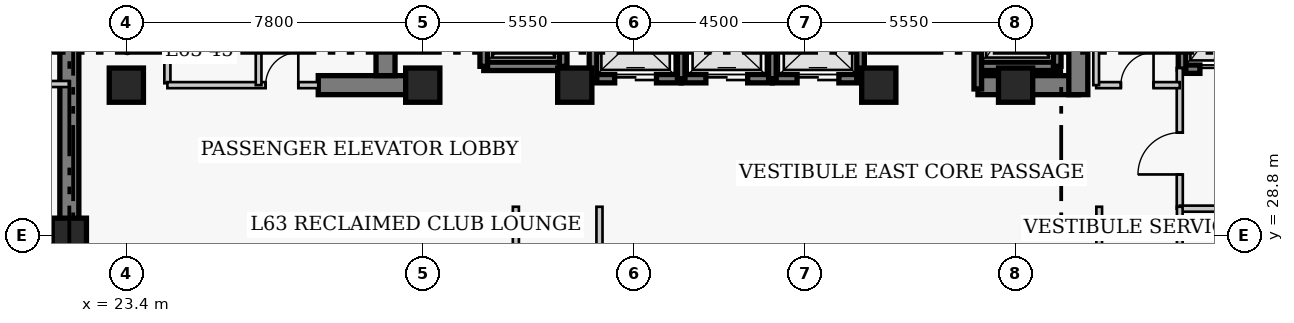
"""IFC4 building model, lengths in metres.
Left out: names, types, materials, properties, quantities, classifications, styles, units other than length and angle.
Written with IfcOpenShell. Run it as: python <this file> out.ifc"""

import sys

from ifc_helpers import new_model, si_unit, direction, frame, frame_2d, origin, origin_2d, place, context, subcontext, project, spatial, rectangle, extrude, element, fill, save


model = new_model("IFC4")
c1 = context("Model", 3, precision=1e-05, world=origin(), true_north=direction((0.0, 1.0)))
c2 = subcontext(c1, "Body", "Model", "MODEL_VIEW")
j1 = project(units=[si_unit("LENGTHUNIT", "METRE"), si_unit("PLANEANGLEUNIT", "RADIAN")], contexts=[c1])
p1 = place(None, origin())
s1 = spatial("IfcSite", under=j1, at=p1, CompositionType="ELEMENT")
p2 = place(p1, origin())
s2 = spatial("IfcBuilding", under=s1, at=p2, CompositionType="ELEMENT")
p3 = place(p2, frame((0.0, 0.0, 253.4)))
s3 = spatial("IfcBuildingStorey", under=s2, at=p3, CompositionType="ELEMENT", Elevation=253.4)
p4 = place(p3, frame((21.9, 27.05, 0.0), z_axis=(0.0, 0.0, 1.0), x_axis=(0.0, 1.0, 0.0)))
e1 = element("IfcWall", 1, at=p4, inside=s3, PredefinedType="SHEAR", context=c2, shape_type="SweptSolid", body=[
    extrude(rectangle(XDim=13.52, YDim=0.5, at=frame_2d((6.76, 0.0))), origin(), (0.0, 0.0, 1.0), 4.0),
])
p5 = place(p3, frame((28.45, 32.75, 0.0), z_axis=(0.0, 0.0, 1.0), x_axis=(1.0, 0.0, 0.0)))
e2 = element("IfcWall", 2, at=p5, inside=s3, PredefinedType="SHEAR", context=c2, shape_type="SweptSolid", body=[
    extrude(rectangle(XDim=2.4, YDim=0.5, at=frame_2d((1.2, 0.0))), origin(), (0.0, 0.0, 1.0), 4.0),
])
p6 = place(p3, frame((45.81, 32.75, 0.0), z_axis=(0.0, 0.0, 1.0), x_axis=(1.0, 0.0, 0.0)))
e3 = element("IfcWall", 3, at=p6, inside=s3, PredefinedType="SHEAR", context=c2, shape_type="SweptSolid", body=[
    extrude(rectangle(XDim=2.64, YDim=0.5, at=frame_2d((1.32, 0.0))), origin(), (0.0, 0.0, 1.0), 4.0),
])
p7 = place(p3, frame((30.22, 33.0, 0.0), z_axis=(0.0, 0.0, 1.0), x_axis=(0.0, 1.0, 0.0)))
e4 = element("IfcWall", 4, at=p7, inside=s3, PredefinedType="SHEAR", context=c2, shape_type="SweptSolid", body=[
    extrude(rectangle(XDim=7.32, YDim=0.5, at=frame_2d((3.66, 0.0))), origin(), (0.0, 0.0, 1.0), 4.0),
])
p8 = place(p3, frame((48.45, 32.5, 0.0), z_axis=(0.0, 0.0, 1.0), x_axis=(0.0, 1.0, 0.0)))
e5 = element("IfcWall", 5, at=p8, inside=s3, PredefinedType="SHEAR", context=c2, shape_type="SweptSolid", body=[
    extrude(rectangle(XDim=7.82, YDim=0.5, at=frame_2d((3.91, 0.0))), origin(), (0.0, 0.0, 1.0), 4.0),
])
p9 = place(p8, frame((5.7, 0.0, 0.0)))
e6 = element("IfcOpeningElement", 6, at=p9, cuts=e5, PredefinedType="OPENING", context=c2, shape_type="SweptSolid", body=[
    extrude(rectangle(XDim=1.1, YDim=2.15, at=frame_2d((0.55, 1.075))), frame((0.0, 0.26, 0.0), z_axis=(0.0, -1.0, 0.0), x_axis=(1.0, 0.0, 0.0)), (0.0, 0.0, 1.0), 0.52),
])
for number, where, z_axis, x_axis in (
    (7, (21.9, 28.8, 0.0), (0.0, 0.0, 1.0), (1.0, 0.0, 0.0)),
    (8, (23.4, 32.75, 0.0), (0.0, 0.0, 1.0), (1.0, 0.0, 0.0)),
    (9, (31.2, 32.75, 0.0), (0.0, 0.0, 1.0), (1.0, 0.0, 0.0)),
    (10, (35.2, 32.75, 0.0), (0.0, 0.0, 1.0), (1.0, 0.0, 0.0)),
    (11, (43.2, 32.75, 0.0), (0.0, 0.0, 1.0), (1.0, 0.0, 0.0)),
    (12, (46.8, 32.75, 0.0), (0.0, 0.0, 1.0), (1.0, 0.0, 0.0)),
):
    element("IfcColumn", number, at=place(p3, frame(where, z_axis=z_axis, x_axis=x_axis)), inside=s3, PredefinedType="COLUMN", context=c2, shape_type="SweptSolid", body=[
        extrude(rectangle(XDim=0.9, YDim=0.9, at=origin_2d()), origin(), (0.0, 0.0, 1.0), 4.0),
    ])
p10 = place(p3, frame((35.68, 32.92, 0.0), z_axis=(0.0, 0.0, 1.0), x_axis=(1.0, 0.0, 0.0)))
e13 = element("IfcWall", 13, at=p10, inside=s3, PredefinedType="SHEAR", context=c2, shape_type="SweptSolid", body=[
    extrude(rectangle(XDim=2.32, YDim=0.22, at=frame_2d((1.16, 0.0))), origin(), (0.0, 0.0, 1.0), 4.0),
])
p11 = place(p10, frame((0.57, 0.0, 0.0)))
e14 = element("IfcOpeningElement", 14, at=p11, cuts=e13, PredefinedType="OPENING", context=c2, shape_type="SweptSolid", body=[
    extrude(rectangle(XDim=1.1, YDim=2.15, at=frame_2d((0.55, 1.075))), frame((0.0, 0.12, 0.0), z_axis=(0.0, -1.0, 0.0), x_axis=(1.0, 0.0, 0.0)), (0.0, 0.0, 1.0), 0.24),
])
p12 = place(p3, frame((35.68, 32.92, 0.0), z_axis=(0.0, 0.0, 1.0), x_axis=(0.0, 1.0, 0.0)))
e15 = element("IfcWall", 15, at=p12, inside=s3, PredefinedType="SHEAR", context=c2, shape_type="SweptSolid", body=[
    extrude(rectangle(XDim=2.16, YDim=0.2, at=frame_2d((1.08, 0.0))), origin(), (0.0, 0.0, 1.0), 4.0),
])
p13 = place(p3, frame((38.0, 32.92, 0.0), z_axis=(0.0, 0.0, 1.0), x_axis=(1.0, 0.0, 0.0)))
e16 = element("IfcWall", 16, at=p13, inside=s3, PredefinedType="SHEAR", context=c2, shape_type="SweptSolid", body=[
    extrude(rectangle(XDim=2.4, YDim=0.22, at=frame_2d((1.2, 0.0))), origin(), (0.0, 0.0, 1.0), 4.0),
])
p14 = place(p13, frame((0.65, 0.0, 0.0)))
e17 = element("IfcOpeningElement", 17, at=p14, cuts=e16, PredefinedType="OPENING", context=c2, shape_type="SweptSolid", body=[
    extrude(rectangle(XDim=1.1, YDim=2.15, at=frame_2d((0.55, 1.075))), frame((0.0, 0.12, 0.0), z_axis=(0.0, -1.0, 0.0), x_axis=(1.0, 0.0, 0.0)), (0.0, 0.0, 1.0), 0.24),
])
p15 = place(p3, frame((38.0, 32.92, 0.0), z_axis=(0.0, 0.0, 1.0), x_axis=(0.0, 1.0, 0.0)))
e18 = element("IfcWall", 18, at=p15, inside=s3, PredefinedType="SHEAR", context=c2, shape_type="SweptSolid", body=[
    extrude(rectangle(XDim=2.16, YDim=0.2, at=frame_2d((1.08, 0.0))), origin(), (0.0, 0.0, 1.0), 4.0),
])
p16 = place(p3, frame((40.4, 32.92, 0.0), z_axis=(0.0, 0.0, 1.0), x_axis=(1.0, 0.0, 0.0)))
e19 = element("IfcWall", 19, at=p16, inside=s3, PredefinedType="SHEAR", context=c2, shape_type="SweptSolid", body=[
    extrude(rectangle(XDim=2.32, YDim=0.22, at=frame_2d((1.16, 0.0))), origin(), (0.0, 0.0, 1.0), 4.0),
])
p17 = place(p16, frame((0.65, 0.0, 0.0)))
e20 = element("IfcOpeningElement", 20, at=p17, cuts=e19, PredefinedType="OPENING", context=c2, shape_type="SweptSolid", body=[
    extrude(rectangle(XDim=1.1, YDim=2.15, at=frame_2d((0.55, 1.075))), frame((0.0, 0.12, 0.0), z_axis=(0.0, -1.0, 0.0), x_axis=(1.0, 0.0, 0.0)), (0.0, 0.0, 1.0), 0.24),
])
for number, where, z_axis, x_axis in (
    (21, (40.4, 32.92, 0.0), (0.0, 0.0, 1.0), (0.0, 1.0, 0.0)),
    (22, (42.72, 32.92, 0.0), (0.0, 0.0, 1.0), (0.0, 1.0, 0.0)),
):
    element("IfcWall", number, at=place(p3, frame(where, z_axis=z_axis, x_axis=x_axis)), inside=s3, PredefinedType="SHEAR", context=c2, shape_type="SweptSolid", body=[
        extrude(rectangle(XDim=2.16, YDim=0.2, at=frame_2d((1.08, 0.0))), origin(), (0.0, 0.0, 1.0), 4.0),
    ])
p18 = place(p3, frame((51.18, 33.17, 0.0), z_axis=(0.0, 0.0, 1.0), x_axis=(1.0, 0.0, 0.0)))
e23 = element("IfcWall", 23, at=p18, inside=s3, PredefinedType="SHEAR", context=c2, shape_type="SweptSolid", body=[
    extrude(rectangle(XDim=2.42, YDim=0.22, at=frame_2d((1.21, 0.0))), origin(), (0.0, 0.0, 1.0), 4.0),
])
p19 = place(p18, frame((0.47, 0.0, 0.0)))
e24 = element("IfcOpeningElement", 24, at=p19, cuts=e23, PredefinedType="OPENING", context=c2, shape_type="SweptSolid", body=[
    extrude(rectangle(XDim=1.3, YDim=2.15, at=frame_2d((0.65, 1.075))), frame((0.0, 0.12, 0.0), z_axis=(0.0, -1.0, 0.0), x_axis=(1.0, 0.0, 0.0)), (0.0, 0.0, 1.0), 0.24),
])
p20 = place(p3, frame((51.18, 33.17, 0.0), z_axis=(0.0, 0.0, 1.0), x_axis=(0.0, 1.0, 0.0)))
e25 = element("IfcWall", 25, at=p20, inside=s3, PredefinedType="SHEAR", context=c2, shape_type="SweptSolid", body=[
    extrude(rectangle(XDim=2.86, YDim=0.2, at=frame_2d((1.43, 0.0))), origin(), (0.0, 0.0, 1.0), 4.0),
])
p21 = place(p3, frame((32.805, 33.245, 0.0), z_axis=(0.0, 0.0, 1.0), x_axis=(1.0, 0.0, 0.0)))
e26 = element("IfcWall", 26, at=p21, inside=s3, PredefinedType="SHEAR", context=c2, shape_type="SweptSolid", body=[
    extrude(rectangle(XDim=2.09, YDim=0.22, at=frame_2d((1.045, 0.0))), origin(), (0.0, 0.0, 1.0), 4.0),
])
for number, where, z_axis, x_axis in (
    (27, (32.805, 33.245, 0.0), (0.0, 0.0, 1.0), (0.0, 1.0, 0.0)),
    (28, (34.895, 33.245, 0.0), (0.0, 0.0, 1.0), (0.0, 1.0, 0.0)),
):
    element("IfcWall", number, at=place(p3, frame(where, z_axis=z_axis, x_axis=x_axis)), inside=s3, PredefinedType="SHEAR", context=c2, shape_type="SweptSolid", body=[
        extrude(rectangle(XDim=2.91, YDim=0.2, at=frame_2d((1.455, 0.0))), origin(), (0.0, 0.0, 1.0), 4.0),
    ])
p22 = place(p3, frame((45.805, 33.245, 0.0), z_axis=(0.0, 0.0, 1.0), x_axis=(1.0, 0.0, 0.0)))
e29 = element("IfcWall", 29, at=p22, inside=s3, PredefinedType="SHEAR", context=c2, shape_type="SweptSolid", body=[
    extrude(rectangle(XDim=2.09, YDim=0.22, at=frame_2d((1.045, 0.0))), origin(), (0.0, 0.0, 1.0), 4.0),
])
p23 = place(p3, frame((45.805, 32.65, 0.0), z_axis=(0.0, 0.0, 1.0), x_axis=(0.0, 1.0, 0.0)))
e30 = element("IfcWall", 30, at=p23, inside=s3, PredefinedType="SHEAR", context=c2, shape_type="SweptSolid", body=[
    extrude(rectangle(XDim=3.505, YDim=0.2, at=frame_2d((1.752, 0.0))), origin(), (0.0, 0.0, 1.0), 4.0),
])
p24 = place(p3, frame((47.895, 33.245, 0.0), z_axis=(0.0, 0.0, 1.0), x_axis=(0.0, 1.0, 0.0)))
e31 = element("IfcWall", 31, at=p24, inside=s3, PredefinedType="SHEAR", context=c2, shape_type="SweptSolid", body=[
    extrude(rectangle(XDim=2.91, YDim=0.2, at=frame_2d((1.455, 0.0))), origin(), (0.0, 0.0, 1.0), 4.0),
])
p25 = place(p3, frame((24.48, 32.8, 0.0), z_axis=(0.0, 0.0, 1.0), x_axis=(0.0, 1.0, 0.0)))
e32 = element("IfcWall", 32, at=p25, inside=s3, PredefinedType="PARTITIONING", context=c2, shape_type="SweptSolid", body=[
    extrude(rectangle(XDim=3.57, YDim=0.16, at=frame_2d((1.785, 0.0))), origin(), (0.0, 0.0, 1.0), 3.76),
])
p26 = place(p25, frame((1.604, 0.0, 0.0)))
e33 = element("IfcOpeningElement", 33, at=p26, cuts=e32, PredefinedType="OPENING", context=c2, shape_type="SweptSolid", body=[
    extrude(rectangle(XDim=0.9, YDim=2.1, at=frame_2d((0.45, 1.05))), frame((0.0, 0.09, 0.0), z_axis=(0.0, -1.0, 0.0), x_axis=(1.0, 0.0, 0.0)), (0.0, 0.0, 1.0), 0.18),
])
p27 = place(p3, frame((51.12, 29.5, 0.0), z_axis=(0.0, 0.0, 1.0), x_axis=(0.0, 1.0, 0.0)))
e34 = element("IfcWall", 34, at=p27, inside=s3, PredefinedType="PARTITIONING", context=c2, shape_type="SweptSolid", body=[
    extrude(rectangle(XDim=3.7, YDim=0.16, at=frame_2d((1.85, 0.0))), origin(), (0.0, 0.0, 1.0), 3.76),
])
p28 = place(p27, frame((0.9, 0.0, 0.0)))
e35 = element("IfcOpeningElement", 35, at=p28, cuts=e34, PredefinedType="OPENING", context=c2, shape_type="SweptSolid", body=[
    extrude(rectangle(XDim=1.1, YDim=2.15, at=frame_2d((0.55, 1.075))), frame((0.0, 0.09, 0.0), z_axis=(0.0, -1.0, 0.0), x_axis=(1.0, 0.0, 0.0)), (0.0, 0.0, 1.0), 0.18),
])
p29 = place(p3, frame((51.12, 29.5, 0.0), z_axis=(0.0, 0.0, 1.0), x_axis=(1.0, 0.0, 0.0)))
e36 = element("IfcWall", 36, at=p29, inside=s3, PredefinedType="PARTITIONING", context=c2, shape_type="SweptSolid", body=[
    extrude(rectangle(XDim=5.63, YDim=0.16, at=frame_2d((2.815, 0.0))), origin(), (0.0, 0.0, 1.0), 3.76),
])
p30 = place(p3, frame((24.48, 32.75, 0.0), z_axis=(0.0, 0.0, 1.0), x_axis=(1.0, 0.0, 0.0)))
e37 = element("IfcWall", 37, at=p30, inside=s3, PredefinedType="PARTITIONING", context=c2, shape_type="SweptSolid", body=[
    extrude(rectangle(XDim=3.97, YDim=0.16, at=frame_2d((1.985, 0.0))), origin(), (0.0, 0.0, 1.0), 3.76),
])
p31 = place(p30, frame((2.585, 0.0, 0.0)))
e38 = element("IfcOpeningElement", 38, at=p31, cuts=e37, PredefinedType="OPENING", context=c2, shape_type="SweptSolid", body=[
    extrude(rectangle(XDim=0.86, YDim=2.05, at=frame_2d((0.43, 1.025))), frame((0.0, 0.09, 0.0), z_axis=(0.0, -1.0, 0.0), x_axis=(1.0, 0.0, 0.0)), (0.0, 0.0, 1.0), 0.18),
])
p32 = place(p3, frame((48.92, 32.75, 0.0), z_axis=(0.0, 0.0, 1.0), x_axis=(1.0, 0.0, 0.0)))
e39 = element("IfcWall", 39, at=p32, inside=s3, PredefinedType="PARTITIONING", context=c2, shape_type="SweptSolid", body=[
    extrude(rectangle(XDim=2.2, YDim=0.16, at=frame_2d((1.1, 0.0))), origin(), (0.0, 0.0, 1.0), 3.76),
])
p33 = place(p32, frame((0.65, 0.0, 0.0)))
e40 = element("IfcOpeningElement", 40, at=p33, cuts=e39, PredefinedType="OPENING", context=c2, shape_type="SweptSolid", body=[
    extrude(rectangle(XDim=0.86, YDim=2.05, at=frame_2d((0.43, 1.025))), frame((0.0, 0.09, 0.0), z_axis=(0.0, -1.0, 0.0), x_axis=(1.0, 0.0, 0.0)), (0.0, 0.0, 1.0), 0.18),
])
for number, where, z_axis, x_axis in (
    (41, (48.92, 32.75, 0.0), (0.0, 0.0, 1.0), (0.0, 1.0, 0.0)),
    (42, (26.88, 32.75, 0.0), (0.0, 0.0, 1.0), (0.0, 1.0, 0.0)),
):
    element("IfcWall", number, at=place(p3, frame(where, z_axis=z_axis, x_axis=x_axis)), inside=s3, PredefinedType="PARTITIONING", context=c2, shape_type="SweptSolid", body=[
        extrude(rectangle(XDim=3.62, YDim=0.15, at=frame_2d((1.81, 0.0))), origin(), (0.0, 0.0, 1.0), 3.76),
    ])
for number, where, z_axis, x_axis in (
    (43, (33.65, 25.71, 0.0), (0.0, 0.0, 1.0), (0.0, 1.0, 0.0)),
    (44, (35.85, 25.71, 0.0), (0.0, 0.0, 1.0), (0.0, 1.0, 0.0)),
):
    element("IfcWall", number, at=place(p3, frame(where, z_axis=z_axis, x_axis=x_axis)), inside=s3, PredefinedType="PARTITIONING", context=c2, shape_type="SweptSolid", body=[
        extrude(rectangle(XDim=3.84, YDim=0.16, at=frame_2d((1.92, 0.0))), origin(), (0.0, 0.0, 1.0), 3.76),
    ])
p34 = place(p3, frame((19.96, 32.78, 0.0), z_axis=(0.0, 0.0, 1.0), x_axis=(1.0, 0.0, 0.0)))
e45 = element("IfcWall", 45, at=p34, inside=s3, PredefinedType="PARTITIONING", context=c2, shape_type="SweptSolid", body=[
    extrude(rectangle(XDim=1.94, YDim=0.16, at=frame_2d((0.97, 0.0))), origin(), (0.0, 0.0, 1.0), 3.76),
])
for number, where, z_axis, x_axis in (
    (46, (49.0, 25.71, 0.0), (0.0, 0.0, 1.0), (0.0, 1.0, 0.0)),
    (47, (51.12, 25.71, 0.0), (0.0, 0.0, 1.0), (0.0, 1.0, 0.0)),
):
    element("IfcWall", number, at=place(p3, frame(where, z_axis=z_axis, x_axis=x_axis)), inside=s3, PredefinedType="PARTITIONING", context=c2, shape_type="SweptSolid", body=[
        extrude(rectangle(XDim=3.84, YDim=0.15, at=frame_2d((1.92, 0.0))), origin(), (0.0, 0.0, 1.0), 3.76),
    ])
p35 = place(p11, origin())
e48 = element("IfcDoor", 48, at=p35, inside=s3, OperationType="DOUBLE_DOOR_SLIDING", PredefinedType="DOOR", context=c2, shape_type="SweptSolid", body=[
    extrude(rectangle(XDim=1.1, YDim=2.15, at=frame_2d((0.55, 1.075))), frame((0.0, 0.025, 0.0), z_axis=(0.0, -1.0, 0.0), x_axis=(1.0, 0.0, 0.0)), (0.0, 0.0, 1.0), 0.05),
])
fill(e14, e48)
p36 = place(p14, origin())
e49 = element("IfcDoor", 49, at=p36, inside=s3, OperationType="DOUBLE_DOOR_SLIDING", PredefinedType="DOOR", context=c2, shape_type="SweptSolid", body=[
    extrude(rectangle(XDim=1.1, YDim=2.15, at=frame_2d((0.55, 1.075))), frame((0.0, 0.025, 0.0), z_axis=(0.0, -1.0, 0.0), x_axis=(1.0, 0.0, 0.0)), (0.0, 0.0, 1.0), 0.05),
])
fill(e17, e49)
p37 = place(p17, origin())
e50 = element("IfcDoor", 50, at=p37, inside=s3, OperationType="DOUBLE_DOOR_SLIDING", PredefinedType="DOOR", context=c2, shape_type="SweptSolid", body=[
    extrude(rectangle(XDim=1.1, YDim=2.15, at=frame_2d((0.55, 1.075))), frame((0.0, 0.025, 0.0), z_axis=(0.0, -1.0, 0.0), x_axis=(1.0, 0.0, 0.0)), (0.0, 0.0, 1.0), 0.05),
])
fill(e20, e50)
p38 = place(p19, origin())
e51 = element("IfcDoor", 51, at=p38, inside=s3, OperationType="DOUBLE_DOOR_SLIDING", PredefinedType="DOOR", context=c2, shape_type="SweptSolid", body=[
    extrude(rectangle(XDim=1.3, YDim=2.15, at=frame_2d((0.65, 1.075))), frame((0.0, 0.025, 0.0), z_axis=(0.0, -1.0, 0.0), x_axis=(1.0, 0.0, 0.0)), (0.0, 0.0, 1.0), 0.05),
])
fill(e24, e51)
p39 = place(p28, origin())
e52 = element("IfcDoor", 52, at=p39, inside=s3, OperationType="SINGLE_SWING_LEFT", PredefinedType="DOOR", context=c2, shape_type="SweptSolid", body=[
    extrude(rectangle(XDim=1.1, YDim=2.15, at=frame_2d((0.55, 1.075))), frame((0.0, 0.025, 0.0), z_axis=(0.0, -1.0, 0.0), x_axis=(1.0, 0.0, 0.0)), (0.0, 0.0, 1.0), 0.05),
])
fill(e35, e52)
p40 = place(p31, origin())
e53 = element("IfcDoor", 53, at=p40, inside=s3, OperationType="SINGLE_SWING_RIGHT", PredefinedType="DOOR", context=c2, shape_type="SweptSolid", body=[
    extrude(rectangle(XDim=0.86, YDim=2.05, at=frame_2d((0.43, 1.025))), frame((0.0, 0.025, 0.0), z_axis=(0.0, -1.0, 0.0), x_axis=(1.0, 0.0, 0.0)), (0.0, 0.0, 1.0), 0.05),
])
fill(e38, e53)
p41 = place(p33, origin())
e54 = element("IfcDoor", 54, at=p41, inside=s3, OperationType="SINGLE_SWING_RIGHT", PredefinedType="DOOR", context=c2, shape_type="SweptSolid", body=[
    extrude(rectangle(XDim=0.86, YDim=2.05, at=frame_2d((0.43, 1.025))), frame((0.0, 0.025, 0.0), z_axis=(0.0, -1.0, 0.0), x_axis=(1.0, 0.0, 0.0)), (0.0, 0.0, 1.0), 0.05),
])
fill(e40, e54)
save(model, sys.argv[1])
